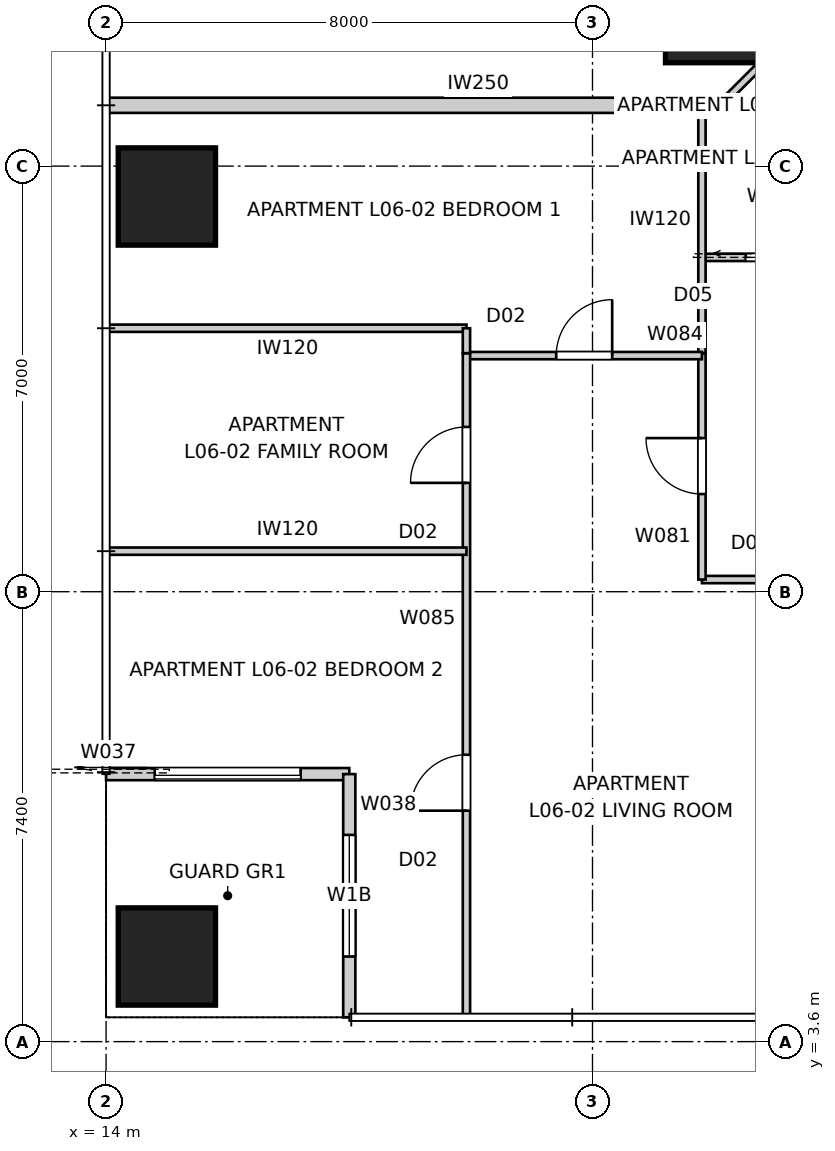
"""IFC4 building model, lengths in metres.
Left out: names, types, materials, properties, quantities, classifications, styles, units other than length and angle.
Written with IfcOpenShell. Run it as: python <this file> out.ifc"""

import sys

from ifc_helpers import new_model, si_unit, direction, frame, frame_2d, origin, origin_2d, place, context, subcontext, project, spatial, rectangle, extrude, element, fill, save


model = new_model("IFC4")
c1 = context("Model", 3, precision=1e-05, world=origin(), true_north=direction((0.0, 1.0)))
c2 = subcontext(c1, "Body", "Model", "MODEL_VIEW")
j1 = project(units=[si_unit("LENGTHUNIT", "METRE"), si_unit("PLANEANGLEUNIT", "RADIAN")], contexts=[c1])
p1 = place(None, origin())
s1 = spatial("IfcSite", under=j1, at=p1, CompositionType="ELEMENT")
p2 = place(p1, origin())
s2 = spatial("IfcBuilding", under=s1, at=p2, CompositionType="ELEMENT")
p3 = place(p2, frame((0.0, 0.0, 25.2)))
s3 = spatial("IfcBuildingStorey", under=s2, at=p3, CompositionType="ELEMENT", Elevation=25.2)
for number, where, z_axis, x_axis in (
    (1, (15.0, 5.0, 0.0), (0.0, 0.0, 1.0), (1.0, 0.0, 0.0)),
    (2, (15.0, 17.5, 0.0), (0.0, 0.0, 1.0), (1.0, 0.0, 0.0)),
    (3, (24.0, 20.5, 0.0), (0.0, 0.0, 1.0), (1.0, 0.0, 0.0)),
):
    element("IfcColumn", number, at=place(p3, frame(where, z_axis=z_axis, x_axis=x_axis)), inside=s3, PredefinedType="COLUMN", context=c2, shape_type="SweptSolid", body=[
        extrude(rectangle(XDim=1.6, YDim=1.6, at=origin_2d()), origin(), (0.0, 0.0, 1.0), 3.4),
    ])
p4 = place(p3, frame((14.0, 8.0, 0.0), z_axis=(0.0, 0.0, 1.0), x_axis=(1.0, 0.0, 0.0)))
e4 = element("IfcWall", 4, at=p4, inside=s3, PredefinedType="SOLIDWALL", context=c2, shape_type="SweptSolid", body=[
    extrude(rectangle(XDim=4.0, YDim=0.2, at=frame_2d((2.0, 0.0))), origin(), (0.0, 0.0, 1.0), 3.25),
])
p5 = place(p4, frame((0.8, 0.0, 0.0)))
e5 = element("IfcOpeningElement", 5, at=p5, cuts=e4, PredefinedType="OPENING", context=c2, shape_type="SweptSolid", body=[
    extrude(rectangle(XDim=2.4, YDim=2.1, at=frame_2d((1.2, 1.05))), frame((0.0, 0.11, 0.0), z_axis=(0.0, -1.0, 0.0), x_axis=(1.0, 0.0, 0.0)), (0.0, 0.0, 1.0), 0.22),
])
p6 = place(p3, frame((18.0, 8.0, 0.0), z_axis=(0.0, 0.0, 1.0), x_axis=(0.0, -1.0, 0.0)))
e6 = element("IfcWall", 6, at=p6, inside=s3, PredefinedType="SOLIDWALL", context=c2, shape_type="SweptSolid", body=[
    extrude(rectangle(XDim=4.0, YDim=0.2, at=frame_2d((2.0, 0.0))), origin(), (0.0, 0.0, 1.0), 3.25),
])
p7 = place(p6, frame((1.0, 0.0, 0.45)))
e7 = element("IfcOpeningElement", 7, at=p7, cuts=e6, PredefinedType="OPENING", context=c2, shape_type="SweptSolid", body=[
    extrude(rectangle(XDim=2.0, YDim=1.8, at=frame_2d((1.0, 0.9))), frame((0.0, 0.11, 0.0), z_axis=(0.0, -1.0, 0.0), x_axis=(1.0, 0.0, 0.0)), (0.0, 0.0, 1.0), 0.22),
])
p8 = place(p3, frame((14.0, 19.0, 0.0), z_axis=(0.0, 0.0, 1.0), x_axis=(1.0, 0.0, 0.0)))
e8 = element("IfcWall", 8, at=p8, inside=s3, PredefinedType="PARTITIONING", context=c2, shape_type="SweptSolid", body=[
    extrude(rectangle(XDim=12.24, YDim=0.25, at=frame_2d((6.12, 0.0))), origin(), (0.0, 0.0, 1.0), 3.25),
])
p9 = place(p3, frame((24.1, 19.0, 0.0), z_axis=(0.0, 0.0, 1.0), x_axis=(0.707106781187, 0.707106781187, 0.0)))
e9 = element("IfcWall", 9, at=p9, inside=s3, PredefinedType="PARTITIONING", context=c2, shape_type="SweptSolid", body=[
    extrude(rectangle(XDim=0.919, YDim=0.12, at=frame_2d((0.459, 0.0))), origin(), (0.0, 0.0, 1.0), 3.25),
])
p10 = place(p3, frame((23.8, 16.499, 0.0), z_axis=(0.0, 0.0, 1.0), x_axis=(1.0, 0.0, 0.0)))
e10 = element("IfcWall", 10, at=p10, inside=s3, PredefinedType="PARTITIONING", context=c2, shape_type="SweptSolid", body=[
    extrude(rectangle(XDim=2.4, YDim=0.12, at=frame_2d((1.2, 0.0))), origin(), (0.0, 0.0, 1.0), 3.25),
])
p11 = place(p10, frame((0.72, 0.0, 0.0)))
e11 = element("IfcOpeningElement", 11, at=p11, cuts=e10, PredefinedType="OPENING", context=c2, shape_type="SweptSolid", body=[
    extrude(rectangle(XDim=0.96, YDim=2.1, at=frame_2d((0.48, 1.05))), frame((0.0, 0.07, 0.0), z_axis=(0.0, -1.0, 0.0), x_axis=(1.0, 0.0, 0.0)), (0.0, 0.0, 1.0), 0.14),
])
p12 = place(p3, frame((56.2, 11.2, 0.0), z_axis=(0.0, 0.0, 1.0), x_axis=(-1.0, 0.0, 0.0)))
e12 = element("IfcWall", 12, at=p12, inside=s3, PredefinedType="PARTITIONING", context=c2, shape_type="SweptSolid", body=[
    extrude(rectangle(XDim=32.4, YDim=0.12, at=frame_2d((16.2, 0.0))), origin(), (0.0, 0.0, 1.0), 3.25),
])
p13 = place(p12, frame((24.882, 0.0, 0.0)))
e13 = element("IfcOpeningElement", 13, at=p13, cuts=e12, PredefinedType="OPENING", context=c2, shape_type="SweptSolid", body=[
    extrude(rectangle(XDim=0.92, YDim=2.34, at=frame_2d((0.46, 1.17))), frame((0.0, 0.07, 0.0), z_axis=(0.0, -1.0, 0.0), x_axis=(1.0, 0.0, 0.0)), (0.0, 0.0, 1.0), 0.14),
])
p14 = place(p12, frame((22.477, 0.0, 0.0)))
e14 = element("IfcOpeningElement", 14, at=p14, cuts=e12, PredefinedType="OPENING", context=c2, shape_type="SweptSolid", body=[
    extrude(rectangle(XDim=0.92, YDim=2.34, at=frame_2d((0.46, 1.17))), frame((0.0, 0.07, 0.0), z_axis=(0.0, -1.0, 0.0), x_axis=(1.0, 0.0, 0.0)), (0.0, 0.0, 1.0), 0.14),
])
p15 = place(p12, frame((6.598, 0.0, 0.0)))
e15 = element("IfcOpeningElement", 15, at=p15, cuts=e12, PredefinedType="OPENING", context=c2, shape_type="SweptSolid", body=[
    extrude(rectangle(XDim=0.92, YDim=2.34, at=frame_2d((0.46, 1.17))), frame((0.0, 0.07, 0.0), z_axis=(0.0, -1.0, 0.0), x_axis=(1.0, 0.0, 0.0)), (0.0, 0.0, 1.0), 0.14),
])
p16 = place(p12, frame((28.598, 0.0, 0.0)))
e16 = element("IfcOpeningElement", 16, at=p16, cuts=e12, PredefinedType="OPENING", context=c2, shape_type="SweptSolid", body=[
    extrude(rectangle(XDim=0.92, YDim=2.34, at=frame_2d((0.46, 1.17))), frame((0.0, 0.07, 0.0), z_axis=(0.0, -1.0, 0.0), x_axis=(1.0, 0.0, 0.0)), (0.0, 0.0, 1.0), 0.14),
])
p17 = place(p12, frame((2.862, 0.0, 0.0)))
e17 = element("IfcOpeningElement", 17, at=p17, cuts=e12, PredefinedType="OPENING", context=c2, shape_type="SweptSolid", body=[
    extrude(rectangle(XDim=0.96, YDim=2.1, at=frame_2d((0.48, 1.05))), frame((0.0, 0.07, 0.0), z_axis=(0.0, -1.0, 0.0), x_axis=(1.0, 0.0, 0.0)), (0.0, 0.0, 1.0), 0.14),
])
p18 = place(p12, frame((10.363, 0.0, 0.0)))
e18 = element("IfcOpeningElement", 18, at=p18, cuts=e12, PredefinedType="OPENING", context=c2, shape_type="SweptSolid", body=[
    extrude(rectangle(XDim=0.96, YDim=2.1, at=frame_2d((0.48, 1.05))), frame((0.0, 0.07, 0.0), z_axis=(0.0, -1.0, 0.0), x_axis=(1.0, 0.0, 0.0)), (0.0, 0.0, 1.0), 0.14),
])
p19 = place(p12, frame((13.862, 0.0, 0.0)))
e19 = element("IfcOpeningElement", 19, at=p19, cuts=e12, PredefinedType="OPENING", context=c2, shape_type="SweptSolid", body=[
    extrude(rectangle(XDim=0.96, YDim=2.1, at=frame_2d((0.48, 1.05))), frame((0.0, 0.07, 0.0), z_axis=(0.0, -1.0, 0.0), x_axis=(1.0, 0.0, 0.0)), (0.0, 0.0, 1.0), 0.14),
])
p20 = place(p12, frame((17.529, 0.0, 0.0)))
e20 = element("IfcOpeningElement", 20, at=p20, cuts=e12, PredefinedType="OPENING", context=c2, shape_type="SweptSolid", body=[
    extrude(rectangle(XDim=0.96, YDim=2.1, at=frame_2d((0.48, 1.05))), frame((0.0, 0.07, 0.0), z_axis=(0.0, -1.0, 0.0), x_axis=(1.0, 0.0, 0.0)), (0.0, 0.0, 1.0), 0.14),
])
p21 = place(p3, frame((23.8, 11.2, 0.0), z_axis=(0.0, 0.0, 1.0), x_axis=(0.0, 1.0, 0.0)))
e21 = element("IfcWall", 21, at=p21, inside=s3, PredefinedType="PARTITIONING", context=c2, shape_type="SweptSolid", body=[
    extrude(rectangle(XDim=3.723, YDim=0.12, at=frame_2d((1.862, 0.0))), origin(), (0.0, 0.0, 1.0), 3.25),
])
p22 = place(p21, frame((1.407, 0.0, 0.0)))
e22 = element("IfcOpeningElement", 22, at=p22, cuts=e21, PredefinedType="OPENING", context=c2, shape_type="SweptSolid", body=[
    extrude(rectangle(XDim=0.92, YDim=2.34, at=frame_2d((0.46, 1.17))), frame((0.0, 0.07, 0.0), z_axis=(0.0, -1.0, 0.0), x_axis=(1.0, 0.0, 0.0)), (0.0, 0.0, 1.0), 0.14),
])
p23 = place(p3, frame((23.8, 15.233, 0.0), z_axis=(0.0, 0.0, 1.0), x_axis=(0.0, 1.0, 0.0)))
e23 = element("IfcWall", 23, at=p23, inside=s3, PredefinedType="PARTITIONING", context=c2, shape_type="SweptSolid", body=[
    extrude(rectangle(XDim=3.767, YDim=0.12, at=frame_2d((1.883, 0.0))), origin(), (0.0, 0.0, 1.0), 3.25),
])
p24 = place(p3, frame((19.927, 14.883, 0.0), z_axis=(0.0, 0.0, 1.0), x_axis=(1.0, 0.0, 0.0)))
e24 = element("IfcWall", 24, at=p24, inside=s3, PredefinedType="PARTITIONING", context=c2, shape_type="SweptSolid", body=[
    extrude(rectangle(XDim=3.873, YDim=0.12, at=frame_2d((1.937, 0.0))), origin(), (0.0, 0.0, 1.0), 3.25),
])
p25 = place(p24, frame((1.477, 0.0, 0.0)))
e25 = element("IfcOpeningElement", 25, at=p25, cuts=e24, PredefinedType="OPENING", context=c2, shape_type="SweptSolid", body=[
    extrude(rectangle(XDim=0.92, YDim=2.34, at=frame_2d((0.46, 1.17))), frame((0.0, 0.07, 0.0), z_axis=(0.0, -1.0, 0.0), x_axis=(1.0, 0.0, 0.0)), (0.0, 0.0, 1.0), 0.14),
])
p26 = place(p3, frame((19.927, 4.04, 0.0), z_axis=(0.0, 0.0, 1.0), x_axis=(0.0, 1.0, 0.0)))
e26 = element("IfcWall", 26, at=p26, inside=s3, PredefinedType="PARTITIONING", context=c2, shape_type="SweptSolid", body=[
    extrude(rectangle(XDim=10.883, YDim=0.12, at=frame_2d((5.442, 0.0))), origin(), (0.0, 0.0, 1.0), 3.25),
])
p27 = place(p26, frame((3.358, 0.0, 0.0)))
e27 = element("IfcOpeningElement", 27, at=p27, cuts=e26, PredefinedType="OPENING", context=c2, shape_type="SweptSolid", body=[
    extrude(rectangle(XDim=0.92, YDim=2.34, at=frame_2d((0.46, 1.17))), frame((0.0, 0.07, 0.0), z_axis=(0.0, -1.0, 0.0), x_axis=(1.0, 0.0, 0.0)), (0.0, 0.0, 1.0), 0.14),
])
p28 = place(p26, frame((8.75, 0.0, 0.0)))
e28 = element("IfcOpeningElement", 28, at=p28, cuts=e26, PredefinedType="OPENING", context=c2, shape_type="SweptSolid", body=[
    extrude(rectangle(XDim=0.92, YDim=2.34, at=frame_2d((0.46, 1.17))), frame((0.0, 0.07, 0.0), z_axis=(0.0, -1.0, 0.0), x_axis=(1.0, 0.0, 0.0)), (0.0, 0.0, 1.0), 0.14),
])
p29 = place(p3, frame((19.927, 15.333, 0.0), z_axis=(0.0, 0.0, 1.0), x_axis=(-1.0, 0.0, 0.0)))
e29 = element("IfcWall", 29, at=p29, inside=s3, PredefinedType="PARTITIONING", context=c2, shape_type="SweptSolid", body=[
    extrude(rectangle(XDim=5.887, YDim=0.12, at=frame_2d((2.943, 0.0))), origin(), (0.0, 0.0, 1.0), 2.637),
])
p30 = place(p3, frame((14.04, 11.667, 0.0), z_axis=(0.0, 0.0, 1.0), x_axis=(1.0, 0.0, 0.0)))
e30 = element("IfcWall", 30, at=p30, inside=s3, PredefinedType="PARTITIONING", context=c2, shape_type="SweptSolid", body=[
    extrude(rectangle(XDim=5.887, YDim=0.12, at=frame_2d((2.943, 0.0))), origin(), (0.0, 0.0, 1.0), 3.25),
])
p31 = place(p3, frame((23.8, 15.233, 0.0), z_axis=(0.0, 0.0, 1.0), x_axis=(0.0, -1.0, 0.0)))
e31 = element("IfcWall", 31, at=p31, inside=s3, PredefinedType="PARTITIONING", context=c2, shape_type="SweptSolid", body=[
    extrude(rectangle(XDim=0.31, YDim=0.12, at=frame_2d((0.155, 0.0))), origin(), (0.0, 0.0, 1.0), 3.25),
])
p32 = place(p3, frame((19.927, 15.333, 0.0), z_axis=(0.0, 0.0, 1.0), x_axis=(0.0, -1.0, 0.0)))
e32 = element("IfcWall", 32, at=p32, inside=s3, PredefinedType="PARTITIONING", context=c2, shape_type="SweptSolid", body=[
    extrude(rectangle(XDim=0.41, YDim=0.12, at=frame_2d((0.205, 0.0))), origin(), (0.0, 0.0, 1.0), 3.25),
])
p33 = place(p5, origin())
e33 = element("IfcDoor", 33, at=p33, inside=s3, OperationType="SLIDING_TO_LEFT", PredefinedType="DOOR", context=c2, shape_type="SweptSolid", body=[
    extrude(rectangle(XDim=2.4, YDim=2.1, at=frame_2d((1.2, 1.05))), frame((0.0, 0.025, 0.0), z_axis=(0.0, -1.0, 0.0), x_axis=(1.0, 0.0, 0.0)), (0.0, 0.0, 1.0), 0.05),
])
fill(e5, e33)
p34 = place(p7, origin())
e34 = element("IfcWindow", 34, at=p34, inside=s3, PartitioningType="SINGLE_PANEL", PredefinedType="WINDOW", context=c2, shape_type="SweptSolid", body=[
    extrude(rectangle(XDim=2.0, YDim=1.8, at=frame_2d((1.0, 0.9))), frame((0.0, 0.03, 0.0), z_axis=(0.0, -1.0, 0.0), x_axis=(1.0, 0.0, 0.0)), (0.0, 0.0, 1.0), 0.06),
])
fill(e7, e34)
p35 = place(p22, origin())
e35 = element("IfcDoor", 35, at=p35, inside=s3, OperationType="SINGLE_SWING_RIGHT", PredefinedType="DOOR", context=c2, shape_type="SweptSolid", body=[
    extrude(rectangle(XDim=0.92, YDim=2.34, at=frame_2d((0.46, 1.17))), frame((0.0, 0.025, 0.0), z_axis=(0.0, -1.0, 0.0), x_axis=(1.0, 0.0, 0.0)), (0.0, 0.0, 1.0), 0.05),
])
fill(e22, e35)
p36 = place(p11, origin())
e36 = element("IfcDoor", 36, at=p36, inside=s3, OperationType="SLIDING_TO_LEFT", PredefinedType="DOOR", context=c2, shape_type="SweptSolid", body=[
    extrude(rectangle(XDim=0.96, YDim=2.1, at=frame_2d((0.48, 1.05))), frame((0.0, 0.025, 0.0), z_axis=(0.0, -1.0, 0.0), x_axis=(1.0, 0.0, 0.0)), (0.0, 0.0, 1.0), 0.05),
])
fill(e11, e36)
p37 = place(p27, origin())
e37 = element("IfcDoor", 37, at=p37, inside=s3, OperationType="SINGLE_SWING_LEFT", PredefinedType="DOOR", context=c2, shape_type="SweptSolid", body=[
    extrude(rectangle(XDim=0.92, YDim=2.34, at=frame_2d((0.46, 1.17))), frame((0.0, 0.025, 0.0), z_axis=(0.0, -1.0, 0.0), x_axis=(1.0, 0.0, 0.0)), (0.0, 0.0, 1.0), 0.05),
])
fill(e27, e37)
p38 = place(p25, origin())
e38 = element("IfcDoor", 38, at=p38, inside=s3, OperationType="SINGLE_SWING_RIGHT", PredefinedType="DOOR", context=c2, shape_type="SweptSolid", body=[
    extrude(rectangle(XDim=0.92, YDim=2.34, at=frame_2d((0.46, 1.17))), frame((0.0, 0.025, 0.0), z_axis=(0.0, -1.0, 0.0), x_axis=(1.0, 0.0, 0.0)), (0.0, 0.0, 1.0), 0.05),
])
fill(e25, e38)
p39 = place(p28, origin())
e39 = element("IfcDoor", 39, at=p39, inside=s3, OperationType="SINGLE_SWING_LEFT", PredefinedType="DOOR", context=c2, shape_type="SweptSolid", body=[
    extrude(rectangle(XDim=0.92, YDim=2.34, at=frame_2d((0.46, 1.17))), frame((0.0, 0.025, 0.0), z_axis=(0.0, -1.0, 0.0), x_axis=(1.0, 0.0, 0.0)), (0.0, 0.0, 1.0), 0.05),
])
fill(e28, e39)
save(model, sys.argv[1])
